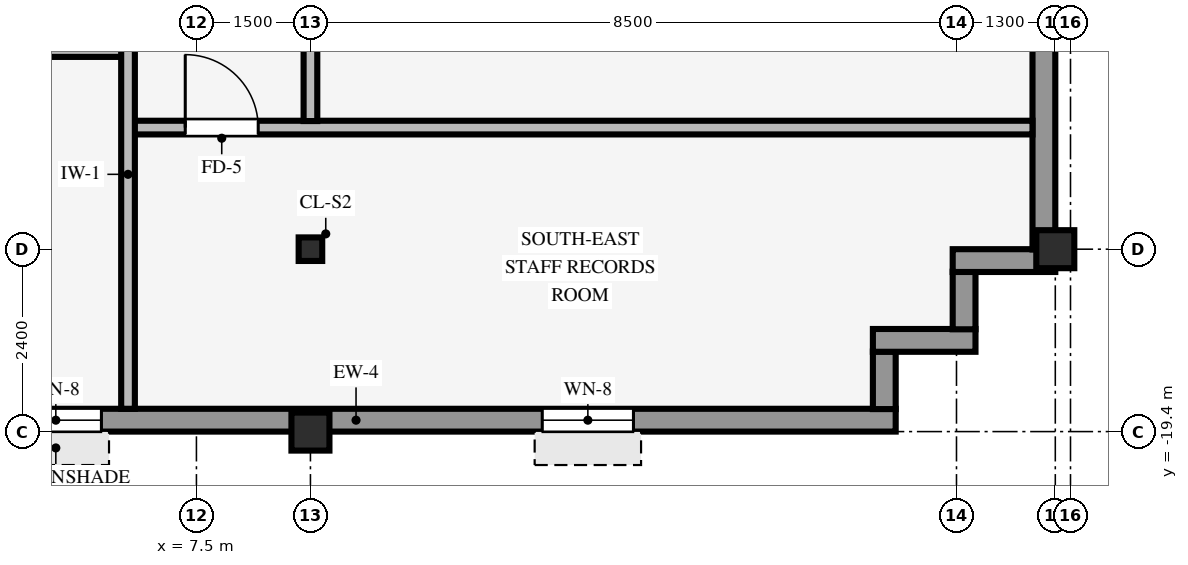
"""IFC4 building model, lengths in metres.
Left out: names, types, materials, properties, quantities, classifications, styles, units other than length and angle.
Written with IfcOpenShell. Run it as: python <this file> out.ifc"""

import sys

from ifc_helpers import new_model, si_unit, direction, frame, frame_2d, origin, origin_2d, place, context, subcontext, project, spatial, rectangle, hollow_rectangle, i_section, extrude, source, transform, mapped, element, fill, save


model = new_model("IFC4")
c1 = context("Model", 3, precision=1e-05, world=origin(), true_north=direction((0.0, 1.0)))
c2 = subcontext(c1, "Body", "Model", "MODEL_VIEW")
j1 = project(units=[si_unit("LENGTHUNIT", "METRE"), si_unit("PLANEANGLEUNIT", "RADIAN")], contexts=[c1])
p1 = place(None, origin())
s1 = spatial("IfcSite", under=j1, at=p1, CompositionType="ELEMENT")
p2 = place(p1, origin())
s2 = spatial("IfcBuilding", under=s1, at=p2, CompositionType="ELEMENT")
p3 = place(p2, frame((0.0, 0.0, 249.3)))
s3 = spatial("IfcBuildingStorey", under=s2, at=p3, CompositionType="ELEMENT", Elevation=249.3)
for number, where, z_axis, x_axis in (
    (1, (18.8, -17.0, 0.0), (0.0, 0.0, 1.0), (1.0, 0.0, 0.0)),
    (2, (9.0, -19.4, 0.0), (0.0, 0.0, 1.0), (1.0, 0.0, 0.0)),
):
    element("IfcColumn", number, at=place(p3, frame(where, z_axis=z_axis, x_axis=x_axis)), inside=s3, PredefinedType="COLUMN", context=c2, shape_type="SweptSolid", body=[
        extrude(hollow_rectangle(XDim=0.5, YDim=0.5, WallThickness=0.032, InnerFilletRadius=0.032, OuterFilletRadius=0.064, at=origin_2d()), origin(), (0.0, 0.0, 1.0), 3.25),
    ])
p4 = place(p3, frame((9.0, -17.0, 0.0), z_axis=(0.0, 0.0, 1.0), x_axis=(1.0, 0.0, 0.0)))
e3 = element("IfcColumn", 3, at=p4, inside=s3, PredefinedType="COLUMN", context=c2, shape_type="SweptSolid", body=[
    extrude(i_section(OverallWidth=0.31, OverallDepth=0.31, WebThickness=0.015, FlangeThickness=0.015, FilletRadius=0.015, at=origin_2d()), origin(), (0.0, 0.0, 1.0), 3.25),
])
p5 = place(p3, frame((2.5, -19.25, 0.0), z_axis=(0.0, 0.0, 1.0), x_axis=(1.0, 0.0, 0.0)))
e4 = element("IfcWall", 4, at=p5, inside=s3, PredefinedType="STANDARD", context=c2, shape_type="SweptSolid", body=[
    extrude(rectangle(XDim=14.2, YDim=0.3, at=frame_2d((7.1, 0.0))), origin(), (0.0, 0.0, 1.0), 2.585),
])
p6 = place(p5, frame((2.55, 0.0, 0.8)))
e5 = element("IfcOpeningElement", 5, at=p6, cuts=e4, PredefinedType="OPENING", context=c2, shape_type="SweptSolid", body=[
    extrude(rectangle(XDim=1.2, YDim=1.48, at=frame_2d((0.6, 0.74))), frame((0.0, 0.16, 0.0), z_axis=(0.0, -1.0, 0.0), x_axis=(1.0, 0.0, 0.0)), (0.0, 0.0, 1.0), 0.32),
])
p7 = place(p5, frame((9.55, 0.0, 0.8)))
e6 = element("IfcOpeningElement", 6, at=p7, cuts=e4, PredefinedType="OPENING", context=c2, shape_type="SweptSolid", body=[
    extrude(rectangle(XDim=1.2, YDim=1.48, at=frame_2d((0.6, 0.74))), frame((0.0, 0.16, 0.0), z_axis=(0.0, -1.0, 0.0), x_axis=(1.0, 0.0, 0.0)), (0.0, 0.0, 1.0), 0.32),
])
p8 = place(p3, frame((16.55, -19.104, 0.0), z_axis=(0.0, 0.0, 1.0), x_axis=(0.0, 1.0, 0.0)))
e7 = element("IfcWall", 7, at=p8, inside=s3, PredefinedType="STANDARD", context=c2, shape_type="SweptSolid", body=[
    extrude(rectangle(XDim=0.758, YDim=0.3, at=frame_2d((0.379, 0.0))), origin(), (0.0, 0.0, 1.0), 2.335),
])
p9 = place(p3, frame((16.4, -18.2, 0.0), z_axis=(0.0, 0.0, 1.0), x_axis=(1.0, 0.0, 0.0)))
e8 = element("IfcWall", 8, at=p9, inside=s3, PredefinedType="STANDARD", context=c2, shape_type="SweptSolid", body=[
    extrude(rectangle(XDim=1.35, YDim=0.3, at=frame_2d((0.675, 0.0))), origin(), (0.0, 0.0, 1.0), 2.335),
])
p10 = place(p3, frame((17.6, -18.054, 0.0), z_axis=(0.0, 0.0, 1.0), x_axis=(0.0, 1.0, 0.0)))
e9 = element("IfcWall", 9, at=p10, inside=s3, PredefinedType="STANDARD", context=c2, shape_type="SweptSolid", body=[
    extrude(rectangle(XDim=0.758, YDim=0.3, at=frame_2d((0.379, 0.0))), origin(), (0.0, 0.0, 1.0), 2.335),
])
p11 = place(p3, frame((17.45, -17.15, 0.0), z_axis=(0.0, 0.0, 1.0), x_axis=(1.0, 0.0, 0.0)))
e10 = element("IfcWall", 10, at=p11, inside=s3, PredefinedType="STANDARD", context=c2, shape_type="SweptSolid", body=[
    extrude(rectangle(XDim=1.35, YDim=0.3, at=frame_2d((0.675, 0.0))), origin(), (0.0, 0.0, 1.0), 2.335),
])
p12 = place(p3, frame((18.65, -17.004, 0.0), z_axis=(0.0, 0.0, 1.0), x_axis=(0.0, 1.0, 0.0)))
e11 = element("IfcWall", 11, at=p12, inside=s3, PredefinedType="STANDARD", context=c2, shape_type="SweptSolid", body=[
    extrude(rectangle(XDim=13.404, YDim=0.3, at=frame_2d((6.702, 0.0))), origin(), (0.0, 0.0, 1.0), 2.585),
])
p13 = place(p12, frame((2.876, 0.0, 0.8)))
e12 = element("IfcOpeningElement", 12, at=p13, cuts=e11, PredefinedType="OPENING", context=c2, shape_type="SweptSolid", body=[
    extrude(rectangle(XDim=1.95, YDim=1.48, at=frame_2d((0.975, 0.74))), frame((0.0, 0.16, 0.0), z_axis=(0.0, -1.0, 0.0), x_axis=(1.0, 0.0, 0.0)), (0.0, 0.0, 1.0), 0.32),
])
p14 = place(p3, frame((6.666, -15.4, 0.0), z_axis=(0.0, 0.0, 1.0), x_axis=(1.0, 0.0, 0.0)))
e13 = element("IfcWall", 13, at=p14, inside=s3, PredefinedType="PARTITIONING", context=c2, shape_type="SweptSolid", body=[
    extrude(rectangle(XDim=11.834, YDim=0.18, at=frame_2d((5.917, 0.0))), origin(), (0.0, 0.0, 1.0), 3.24),
])
p15 = place(p14, frame((0.687, 0.0, 0.0)))
e14 = element("IfcOpeningElement", 14, at=p15, cuts=e13, PredefinedType="OPENING", context=c2, shape_type="SweptSolid", body=[
    extrude(rectangle(XDim=0.96, YDim=2.1, at=frame_2d((0.48, 1.05))), frame((0.0, 0.1, 0.0), z_axis=(0.0, -1.0, 0.0), x_axis=(1.0, 0.0, 0.0)), (0.0, 0.0, 1.0), 0.2),
])
p16 = place(p3, frame((-6.539, -14.4, 0.0), z_axis=(0.0, 0.0, 1.0), x_axis=(1.0, 0.0, 0.0)))
e15 = element("IfcWall", 15, at=p16, inside=s3, PredefinedType="PARTITIONING", context=c2, shape_type="SweptSolid", body=[
    extrude(rectangle(XDim=13.073, YDim=0.14, at=frame_2d((6.537, 0.0))), origin(), (0.0, 0.0, 1.0), 3.24),
])
p17 = place(p3, frame((6.6, -19.1, 0.0), z_axis=(0.0, 0.0, 1.0), x_axis=(0.0, 1.0, 0.0)))
e16 = element("IfcWall", 16, at=p17, inside=s3, PredefinedType="PARTITIONING", context=c2, shape_type="SweptSolid", body=[
    extrude(rectangle(XDim=17.764, YDim=0.18, at=frame_2d((8.882, 0.0))), origin(), (0.0, 0.0, 1.0), 3.24),
])
p18 = place(p17, frame((13.152, 0.0, 0.0)))
e17 = element("IfcOpeningElement", 17, at=p18, cuts=e16, PredefinedType="OPENING", context=c2, shape_type="SweptSolid", body=[
    extrude(rectangle(XDim=0.96, YDim=2.1, at=frame_2d((0.48, 1.05))), frame((0.0, 0.1, 0.0), z_axis=(0.0, -1.0, 0.0), x_axis=(1.0, 0.0, 0.0)), (0.0, 0.0, 1.0), 0.2),
])
p19 = place(p17, frame((6.62, 0.0, 0.0)))
e18 = element("IfcOpeningElement", 18, at=p19, cuts=e16, PredefinedType="OPENING", context=c2, shape_type="SweptSolid", body=[
    extrude(rectangle(XDim=0.96, YDim=2.1, at=frame_2d((0.48, 1.05))), frame((0.0, 0.1, 0.0), z_axis=(0.0, -1.0, 0.0), x_axis=(1.0, 0.0, 0.0)), (0.0, 0.0, 1.0), 0.2),
])
p20 = place(p3, frame((9.0, -15.314, 0.0), z_axis=(0.0, 0.0, 1.0), x_axis=(0.0, 1.0, 0.0)))
e19 = element("IfcWall", 19, at=p20, inside=s3, PredefinedType="PARTITIONING", context=c2, shape_type="SweptSolid", body=[
    extrude(rectangle(XDim=5.318, YDim=0.18, at=frame_2d((2.659, 0.0))), origin(), (0.0, 0.0, 1.0), 2.335),
])
p21 = place(p20, frame((2.179, 0.0, 0.0)))
e20 = element("IfcOpeningElement", 20, at=p21, cuts=e19, PredefinedType="OPENING", context=c2, shape_type="SweptSolid", body=[
    extrude(rectangle(XDim=0.96, YDim=2.1, at=frame_2d((0.48, 1.05))), frame((0.0, 0.1, 0.0), z_axis=(0.0, -1.0, 0.0), x_axis=(1.0, 0.0, 0.0)), (0.0, 0.0, 1.0), 0.2),
])
m1 = source(origin(), c2, "Body", "SweptSolid", [
    extrude(rectangle(XDim=1.2, YDim=1.48, at=frame_2d((0.6, 0.74))), frame((0.0, 0.03, 0.0), z_axis=(0.0, -1.0, 0.0), x_axis=(1.0, 0.0, 0.0)), (0.0, 0.0, 1.0), 0.06),
])
p22 = place(p6, origin())
e21 = element("IfcWindow", 21, at=p22, inside=s3, PartitioningType="SINGLE_PANEL", PredefinedType="WINDOW", context=c2, shape_type="MappedRepresentation", body=[
    mapped(m1, transform((0.0, 0.0, 0.0), scale=1.0)),
])
fill(e5, e21)
p23 = place(p7, origin())
e22 = element("IfcWindow", 22, at=p23, inside=s3, PartitioningType="SINGLE_PANEL", PredefinedType="WINDOW", context=c2, shape_type="MappedRepresentation", body=[
    mapped(m1, transform((0.0, 0.0, 0.0), scale=1.0)),
])
fill(e6, e22)
m2 = source(origin(), c2, "Body", "SweptSolid", [
    extrude(rectangle(XDim=0.96, YDim=2.1, at=frame_2d((0.48, 1.05))), frame((0.0, 0.025, 0.0), z_axis=(0.0, -1.0, 0.0), x_axis=(1.0, 0.0, 0.0)), (0.0, 0.0, 1.0), 0.05),
])
p24 = place(p15, origin())
e23 = element("IfcDoor", 23, at=p24, inside=s3, OperationType="SINGLE_SWING_LEFT", PredefinedType="DOOR", context=c2, shape_type="MappedRepresentation", body=[
    mapped(m2, transform((0.0, 0.0, 0.0), scale=1.0)),
])
fill(e14, e23)
save(model, sys.argv[1])
